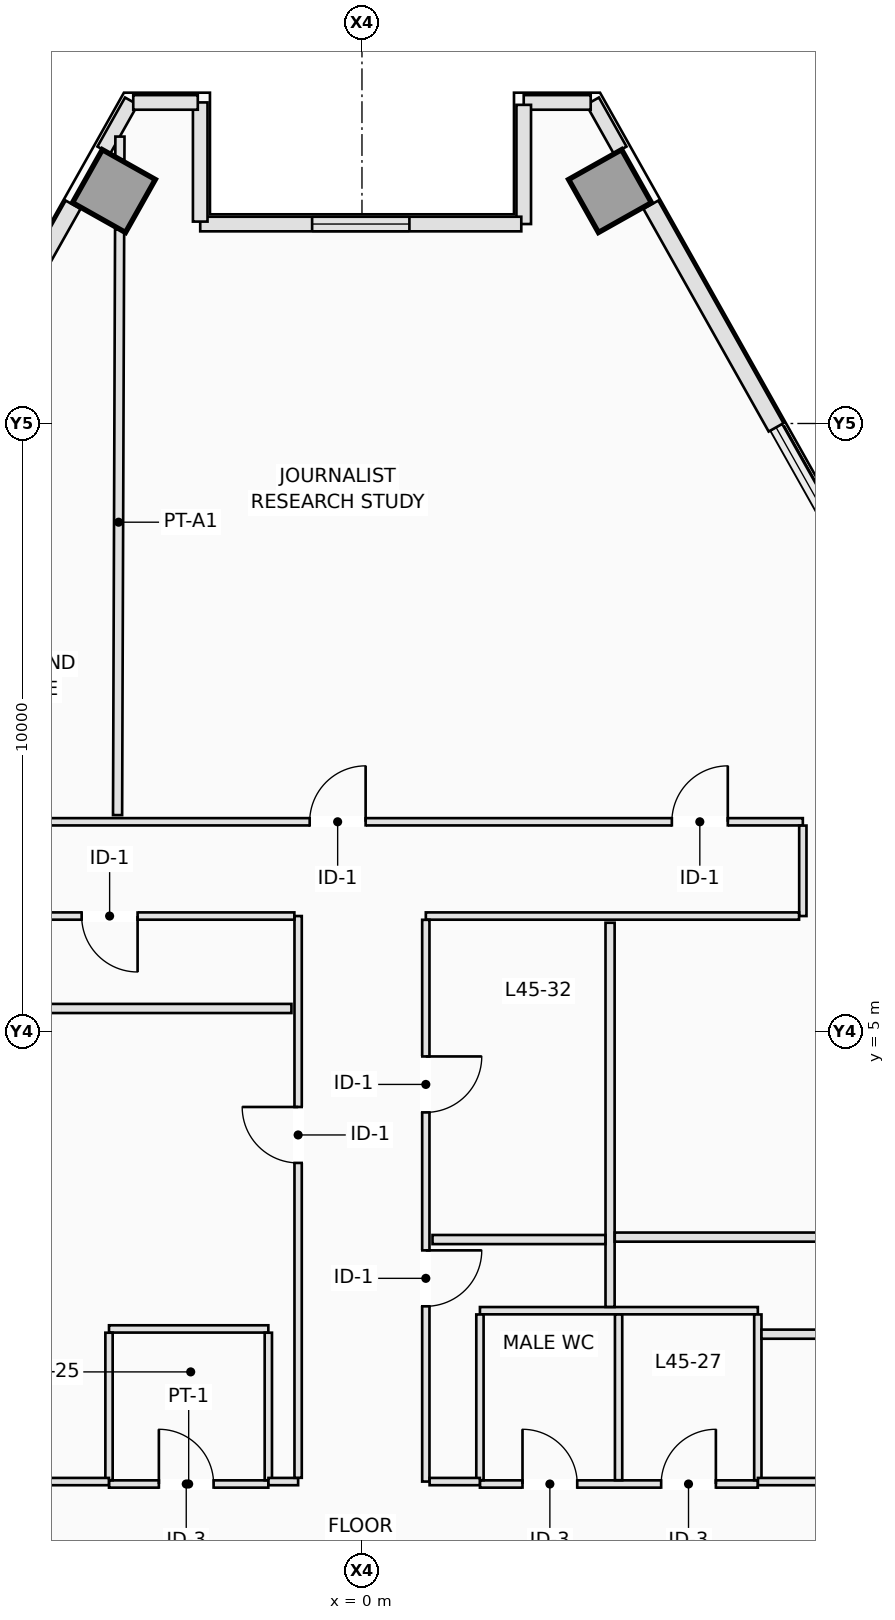
"""IFC4 building model, lengths in metres.
Left out: names, types, materials, properties, quantities, classifications, styles, units other than length and angle.
Written with IfcOpenShell. Run it as: python <this file> out.ifc"""

import sys

from ifc_helpers import new_model, si_unit, direction, frame, frame_2d, origin, origin_2d, place, context, subcontext, project, spatial, rectangle, extrude, element, fill, save


model = new_model("IFC4")
c1 = context("Model", 3, precision=1e-05, world=origin(), true_north=direction((0.0, 1.0)))
c2 = subcontext(c1, "Body", "Model", "MODEL_VIEW")
j1 = project(units=[si_unit("LENGTHUNIT", "METRE"), si_unit("PLANEANGLEUNIT", "RADIAN")], contexts=[c1])
p1 = place(None, origin())
s1 = spatial("IfcSite", under=j1, at=p1, CompositionType="ELEMENT")
p2 = place(p1, origin())
s2 = spatial("IfcBuilding", under=s1, at=p2, CompositionType="ELEMENT")
p3 = place(p2, frame((0.0, 0.0, 165.0)))
s3 = spatial("IfcBuildingStorey", under=s2, at=p3, CompositionType="ELEMENT", Elevation=165.0)
for number, where, z_axis, x_axis in (
    (1, (4.079, 18.822, 0.0), (0.0, 0.0, 1.0), (0.872, 0.49, 0.0)),
    (2, (-4.079, 18.822, 0.0), (0.0, 0.0, 1.0), (-0.872, 0.49, 0.0)),
):
    element("IfcColumn", number, at=place(p3, frame(where, z_axis=z_axis, x_axis=x_axis)), inside=s3, PredefinedType="COLUMN", context=c2, shape_type="SweptSolid", body=[
        extrude(rectangle(XDim=1.0, YDim=1.0, at=origin_2d()), origin(), (0.0, 0.0, 1.0), 3.5),
    ])
p4 = place(p3, frame((3.792, 20.302, 0.0), z_axis=(0.0, 0.0, 1.0), x_axis=(0.490048346303, -0.871695255399, 0.0)))
e3 = element("IfcWall", 3, at=p4, inside=s3, PredefinedType="STANDARD", context=c2, shape_type="SweptSolid", body=[
    extrude(rectangle(XDim=0.926, YDim=0.24, at=frame_2d((0.463, 0.0))), origin(), (0.0, 0.0, 1.0), 3.25),
])
p5 = place(p3, frame((4.751, 18.597, 0.0), z_axis=(0.0, 0.0, 1.0), x_axis=(0.490250201787, -0.871581745821, 0.0)))
e4 = element("IfcWall", 4, at=p5, inside=s3, PredefinedType="STANDARD", context=c2, shape_type="SweptSolid", body=[
    extrude(rectangle(XDim=4.201, YDim=0.28, at=frame_2d((2.1, 0.0))), origin(), (0.0, 0.0, 1.0), 3.25),
])
p6 = place(p3, frame((-4.246, 19.495, 0.0), z_axis=(0.0, 0.0, 1.0), x_axis=(0.490048346303, 0.871695255399, 0.0)))
e5 = element("IfcWall", 5, at=p6, inside=s3, PredefinedType="STANDARD", context=c2, shape_type="SweptSolid", body=[
    extrude(rectangle(XDim=0.926, YDim=0.24, at=frame_2d((0.463, 0.0))), origin(), (0.0, 0.0, 1.0), 3.25),
])
p7 = place(p3, frame((-6.81, 14.936, 0.0), z_axis=(0.0, 0.0, 1.0), x_axis=(0.490250201787, 0.871581745821, 0.0)))
e6 = element("IfcWall", 6, at=p7, inside=s3, PredefinedType="STANDARD", context=c2, shape_type="SweptSolid", body=[
    extrude(rectangle(XDim=4.201, YDim=0.28, at=frame_2d((2.1, 0.0))), origin(), (0.0, 0.0, 1.0), 3.25),
])
p8 = place(p3, frame((3.761, 20.28, 0.0), z_axis=(0.0, 0.0, 1.0), x_axis=(-1.0, 0.0, 0.0)))
e7 = element("IfcWall", 7, at=p8, inside=s3, PredefinedType="STANDARD", context=c2, shape_type="SweptSolid", body=[
    extrude(rectangle(XDim=1.102, YDim=0.24, at=frame_2d((0.551, 0.0))), origin(), (0.0, 0.0, 1.0), 3.25),
])
p9 = place(p3, frame((2.66, 20.24, 0.0), z_axis=(0.0, 0.0, 1.0), x_axis=(0.0, -1.0, 0.0)))
e8 = element("IfcWall", 8, at=p9, inside=s3, PredefinedType="STANDARD", context=c2, shape_type="SweptSolid", body=[
    extrude(rectangle(XDim=1.96, YDim=0.24, at=frame_2d((0.98, 0.0))), origin(), (0.0, 0.0, 1.0), 3.25),
])
p10 = place(p3, frame((2.62, 18.28, 0.0), z_axis=(0.0, 0.0, 1.0), x_axis=(-1.0, 0.0, 0.0)))
e9 = element("IfcWall", 9, at=p10, inside=s3, PredefinedType="STANDARD", context=c2, shape_type="SweptSolid", body=[
    extrude(rectangle(XDim=5.28, YDim=0.24, at=frame_2d((2.64, 0.0))), origin(), (0.0, 0.0, 1.0), 3.25),
])
p11 = place(p10, frame((1.84, 0.0, 0.9)))
e10 = element("IfcOpeningElement", 10, at=p11, cuts=e9, PredefinedType="OPENING", context=c2, shape_type="SweptSolid", body=[
    extrude(rectangle(XDim=1.6, YDim=2.1, at=frame_2d((0.8, 1.05))), frame((0.0, 0.13, 0.0), z_axis=(0.0, -1.0, 0.0), x_axis=(1.0, 0.0, 0.0)), (0.0, 0.0, 1.0), 0.26),
])
p12 = place(p3, frame((-2.66, 18.32, 0.0), z_axis=(0.0, 0.0, 1.0), x_axis=(0.0, 1.0, 0.0)))
e11 = element("IfcWall", 11, at=p12, inside=s3, PredefinedType="STANDARD", context=c2, shape_type="SweptSolid", body=[
    extrude(rectangle(XDim=1.96, YDim=0.24, at=frame_2d((0.98, 0.0))), origin(), (0.0, 0.0, 1.0), 3.25),
])
p13 = place(p3, frame((-2.7, 20.28, 0.0), z_axis=(0.0, 0.0, 1.0), x_axis=(-1.0, 0.0, 0.0)))
e12 = element("IfcWall", 12, at=p13, inside=s3, PredefinedType="STANDARD", context=c2, shape_type="SweptSolid", body=[
    extrude(rectangle(XDim=1.062, YDim=0.24, at=frame_2d((0.531, 0.0))), origin(), (0.0, 0.0, 1.0), 3.25),
])
p14 = place(p3, frame((-4.16, -2.44, 0.0), z_axis=(0.0, 0.0, 1.0), x_axis=(1.0, 0.0, 0.0)))
e13 = element("IfcWall", 13, at=p14, inside=s3, PredefinedType="PARTITIONING", context=c2, shape_type="SweptSolid", body=[
    extrude(rectangle(XDim=2.62, YDim=0.12, at=frame_2d((1.31, 0.0))), origin(), (0.0, 0.0, 1.0), 2.891),
])
p15 = place(p14, frame((0.82, 0.0, 0.0)))
e14 = element("IfcOpeningElement", 14, at=p15, cuts=e13, PredefinedType="OPENING", context=c2, shape_type="SweptSolid", body=[
    extrude(rectangle(XDim=0.9, YDim=2.12, at=frame_2d((0.45, 1.06))), frame((0.0, 0.07, 0.0), z_axis=(0.0, -1.0, 0.0), x_axis=(1.0, 0.0, 0.0)), (0.0, 0.0, 1.0), 0.14),
])
p16 = place(p3, frame((-4.16, 0.11, 0.0), z_axis=(0.0, 0.0, 1.0), x_axis=(1.0, 0.0, 0.0)))
e15 = element("IfcWall", 15, at=p16, inside=s3, PredefinedType="PARTITIONING", context=c2, shape_type="SweptSolid", body=[
    extrude(rectangle(XDim=2.62, YDim=0.12, at=frame_2d((1.31, 0.0))), origin(), (0.0, 0.0, 1.0), 3.25),
])
for number, where, z_axis, x_axis in (
    (16, (-4.16, -2.378, 0.0), (0.0, 0.0, 1.0), (0.0, 1.0, 0.0)),
    (17, (-1.54, -2.378, 0.0), (0.0, 0.0, 1.0), (0.0, 1.0, 0.0)),
):
    element("IfcWall", number, at=place(p3, frame(where, z_axis=z_axis, x_axis=x_axis)), inside=s3, PredefinedType="PARTITIONING", context=c2, shape_type="SweptSolid", body=[
        extrude(rectangle(XDim=2.426, YDim=0.12, at=frame_2d((1.213, 0.0))), origin(), (0.0, 0.0, 1.0), 3.25),
    ])
p17 = place(p3, frame((1.94, -2.44, 0.0), z_axis=(0.0, 0.0, 1.0), x_axis=(1.0, 0.0, 0.0)))
e18 = element("IfcWall", 18, at=p17, inside=s3, PredefinedType="PARTITIONING", context=c2, shape_type="SweptSolid", body=[
    extrude(rectangle(XDim=4.57, YDim=0.12, at=frame_2d((2.285, 0.0))), origin(), (0.0, 0.0, 1.0), 2.891),
])
p18 = place(p17, frame((0.7, 0.0, 0.0)))
e19 = element("IfcOpeningElement", 19, at=p18, cuts=e18, PredefinedType="OPENING", context=c2, shape_type="SweptSolid", body=[
    extrude(rectangle(XDim=0.9, YDim=2.12, at=frame_2d((0.45, 1.06))), frame((0.0, 0.07, 0.0), z_axis=(0.0, -1.0, 0.0), x_axis=(1.0, 0.0, 0.0)), (0.0, 0.0, 1.0), 0.14),
])
p19 = place(p17, frame((2.98, 0.0, 0.0)))
e20 = element("IfcOpeningElement", 20, at=p19, cuts=e18, PredefinedType="OPENING", context=c2, shape_type="SweptSolid", body=[
    extrude(rectangle(XDim=0.9, YDim=2.12, at=frame_2d((0.45, 1.06))), frame((0.0, 0.07, 0.0), z_axis=(0.0, -1.0, 0.0), x_axis=(1.0, 0.0, 0.0)), (0.0, 0.0, 1.0), 0.14),
])
p20 = place(p3, frame((1.94, 0.41, 0.0), z_axis=(0.0, 0.0, 1.0), x_axis=(1.0, 0.0, 0.0)))
e21 = element("IfcWall", 21, at=p20, inside=s3, PredefinedType="PARTITIONING", context=c2, shape_type="SweptSolid", body=[
    extrude(rectangle(XDim=4.57, YDim=0.12, at=frame_2d((2.285, 0.0))), origin(), (0.0, 0.0, 1.0), 3.25),
])
for number, where, z_axis, x_axis in (
    (22, (1.94, -2.378, 0.0), (0.0, 0.0, 1.0), (0.0, 1.0, 0.0)),
    (23, (4.22, -2.378, 0.0), (0.0, 0.0, 1.0), (0.0, 1.0, 0.0)),
    (24, (6.51, -2.378, 0.0), (0.0, 0.0, 1.0), (0.0, 1.0, 0.0)),
):
    element("IfcWall", number, at=place(p3, frame(where, z_axis=z_axis, x_axis=x_axis)), inside=s3, PredefinedType="PARTITIONING", context=c2, shape_type="SweptSolid", body=[
        extrude(rectangle(XDim=2.726, YDim=0.12, at=frame_2d((1.363, 0.0))), origin(), (0.0, 0.0, 1.0), 3.25),
    ])
p21 = place(p3, frame((-12.348, -2.4, 0.0), z_axis=(0.0, 0.0, 1.0), x_axis=(1.0, 0.0, 0.0)))
e25 = element("IfcWall", 25, at=p21, inside=s3, PredefinedType="PARTITIONING", context=c2, shape_type="SweptSolid", body=[
    extrude(rectangle(XDim=8.186, YDim=0.12, at=frame_2d((4.093, 0.0))), origin(), (0.0, 0.0, 1.0), 2.891),
])
p22 = place(p21, frame((3.722, 0.0, 0.0)))
e26 = element("IfcOpeningElement", 26, at=p22, cuts=e25, PredefinedType="OPENING", context=c2, shape_type="SweptSolid", body=[
    extrude(rectangle(XDim=0.92, YDim=2.12, at=frame_2d((0.46, 1.06))), frame((0.0, 0.07, 0.0), z_axis=(0.0, -1.0, 0.0), x_axis=(1.0, 0.0, 0.0)), (0.0, 0.0, 1.0), 0.14),
])
p23 = place(p3, frame((-1.538, -2.4, 0.0), z_axis=(0.0, 0.0, 1.0), x_axis=(1.0, 0.0, 0.0)))
e27 = element("IfcWall", 27, at=p23, inside=s3, PredefinedType="PARTITIONING", context=c2, shape_type="SweptSolid", body=[
    extrude(rectangle(XDim=0.488, YDim=0.12, at=frame_2d((0.244, 0.0))), origin(), (0.0, 0.0, 1.0), 2.891),
])
p24 = place(p3, frame((-1.05, -2.338, 0.0), z_axis=(0.0, 0.0, 1.0), x_axis=(0.0, 1.0, 0.0)))
e28 = element("IfcWall", 28, at=p24, inside=s3, PredefinedType="PARTITIONING", context=c2, shape_type="SweptSolid", body=[
    extrude(rectangle(XDim=9.238, YDim=0.12, at=frame_2d((4.619, 0.0))), origin(), (0.0, 0.0, 1.0), 3.25),
])
p25 = place(p24, frame((5.178, 0.0, 0.0)))
e29 = element("IfcOpeningElement", 29, at=p25, cuts=e28, PredefinedType="OPENING", context=c2, shape_type="SweptSolid", body=[
    extrude(rectangle(XDim=0.92, YDim=2.12, at=frame_2d((0.46, 1.06))), frame((0.0, 0.07, 0.0), z_axis=(0.0, -1.0, 0.0), x_axis=(1.0, 0.0, 0.0)), (0.0, 0.0, 1.0), 0.14),
])
p26 = place(p3, frame((-1.112, 6.9, 0.0), z_axis=(0.0, 0.0, 1.0), x_axis=(-1.0, 0.0, 0.0)))
e30 = element("IfcWall", 30, at=p26, inside=s3, PredefinedType="PARTITIONING", context=c2, shape_type="SweptSolid", body=[
    extrude(rectangle(XDim=6.138, YDim=0.12, at=frame_2d((3.069, 0.0))), origin(), (0.0, 0.0, 1.0), 2.891),
])
p27 = place(p26, frame((2.578, 0.0, 0.0)))
e31 = element("IfcOpeningElement", 31, at=p27, cuts=e30, PredefinedType="OPENING", context=c2, shape_type="SweptSolid", body=[
    extrude(rectangle(XDim=0.92, YDim=2.12, at=frame_2d((0.46, 1.06))), frame((0.0, 0.07, 0.0), z_axis=(0.0, -1.0, 0.0), x_axis=(1.0, 0.0, 0.0)), (0.0, 0.0, 1.0), 0.14),
])
p28 = place(p3, frame((-7.188, 8.45, 0.0), z_axis=(0.0, 0.0, 1.0), x_axis=(1.0, 0.0, 0.0)))
e32 = element("IfcWall", 32, at=p28, inside=s3, PredefinedType="PARTITIONING", context=c2, shape_type="SweptSolid", body=[
    extrude(rectangle(XDim=14.438, YDim=0.12, at=frame_2d((7.219, 0.0))), origin(), (0.0, 0.0, 1.0), 3.25),
])
p29 = place(p28, frame((6.328, 0.0, 0.0)))
e33 = element("IfcOpeningElement", 33, at=p29, cuts=e32, PredefinedType="OPENING", context=c2, shape_type="SweptSolid", body=[
    extrude(rectangle(XDim=0.92, YDim=2.12, at=frame_2d((0.46, 1.06))), frame((0.0, 0.07, 0.0), z_axis=(0.0, -1.0, 0.0), x_axis=(1.0, 0.0, 0.0)), (0.0, 0.0, 1.0), 0.14),
])
p30 = place(p28, frame((12.284, 0.0, 0.0)))
e34 = element("IfcOpeningElement", 34, at=p30, cuts=e32, PredefinedType="OPENING", context=c2, shape_type="SweptSolid", body=[
    extrude(rectangle(XDim=0.92, YDim=2.12, at=frame_2d((0.46, 1.06))), frame((0.0, 0.07, 0.0), z_axis=(0.0, -1.0, 0.0), x_axis=(1.0, 0.0, 0.0)), (0.0, 0.0, 1.0), 0.14),
])
p31 = place(p3, frame((7.25, 8.388, 0.0), z_axis=(0.0, 0.0, 1.0), x_axis=(0.0, -1.0, 0.0)))
e35 = element("IfcWall", 35, at=p31, inside=s3, PredefinedType="PARTITIONING", context=c2, shape_type="SweptSolid", body=[
    extrude(rectangle(XDim=1.488, YDim=0.12, at=frame_2d((0.744, 0.0))), origin(), (0.0, 0.0, 1.0), 3.25),
])
p32 = place(p3, frame((7.188, 6.9, 0.0), z_axis=(0.0, 0.0, 1.0), x_axis=(-1.0, 0.0, 0.0)))
e36 = element("IfcWall", 36, at=p32, inside=s3, PredefinedType="PARTITIONING", context=c2, shape_type="SweptSolid", body=[
    extrude(rectangle(XDim=6.138, YDim=0.12, at=frame_2d((3.069, 0.0))), origin(), (0.0, 0.0, 1.0), 2.891),
])
p33 = place(p3, frame((1.05, 6.838, 0.0), z_axis=(0.0, 0.0, 1.0), x_axis=(0.0, -1.0, 0.0)))
e37 = element("IfcWall", 37, at=p33, inside=s3, PredefinedType="PARTITIONING", context=c2, shape_type="SweptSolid", body=[
    extrude(rectangle(XDim=9.238, YDim=0.12, at=frame_2d((4.619, 0.0))), origin(), (0.0, 0.0, 1.0), 3.25),
])
p34 = place(p33, frame((2.247, 0.0, 0.0)))
e38 = element("IfcOpeningElement", 38, at=p34, cuts=e37, PredefinedType="OPENING", context=c2, shape_type="SweptSolid", body=[
    extrude(rectangle(XDim=0.92, YDim=2.12, at=frame_2d((0.46, 1.06))), frame((0.0, 0.07, 0.0), z_axis=(0.0, -1.0, 0.0), x_axis=(1.0, 0.0, 0.0)), (0.0, 0.0, 1.0), 0.14),
])
p35 = place(p33, frame((5.436, 0.0, 0.0)))
e39 = element("IfcOpeningElement", 39, at=p35, cuts=e37, PredefinedType="OPENING", context=c2, shape_type="SweptSolid", body=[
    extrude(rectangle(XDim=0.92, YDim=2.12, at=frame_2d((0.46, 1.06))), frame((0.0, 0.07, 0.0), z_axis=(0.0, -1.0, 0.0), x_axis=(1.0, 0.0, 0.0)), (0.0, 0.0, 1.0), 0.14),
])
p36 = place(p3, frame((1.112, -2.4, 0.0), z_axis=(0.0, 0.0, 1.0), x_axis=(1.0, 0.0, 0.0)))
e40 = element("IfcWall", 40, at=p36, inside=s3, PredefinedType="PARTITIONING", context=c2, shape_type="SweptSolid", body=[
    extrude(rectangle(XDim=0.826, YDim=0.12, at=frame_2d((0.413, 0.0))), origin(), (0.0, 0.0, 1.0), 2.891),
])
p37 = place(p3, frame((6.512, -2.4, 0.0), z_axis=(0.0, 0.0, 1.0), x_axis=(1.0, 0.0, 0.0)))
e41 = element("IfcWall", 41, at=p37, inside=s3, PredefinedType="PARTITIONING", context=c2, shape_type="SweptSolid", body=[
    extrude(rectangle(XDim=5.898, YDim=0.12, at=frame_2d((2.949, 0.0))), origin(), (0.0, 0.0, 1.0), 3.25),
])
p38 = place(p37, frame((3.441, 0.0, 0.0)))
e42 = element("IfcOpeningElement", 42, at=p38, cuts=e41, PredefinedType="OPENING", context=c2, shape_type="SweptSolid", body=[
    extrude(rectangle(XDim=0.92, YDim=2.12, at=frame_2d((0.46, 1.06))), frame((0.0, 0.07, 0.0), z_axis=(0.0, -1.0, 0.0), x_axis=(1.0, 0.0, 0.0)), (0.0, 0.0, 1.0), 0.14),
])
p39 = place(p3, frame((-4.019, 8.56, 0.0), z_axis=(0.0, 0.0, 1.0), x_axis=(0.003497279608, 0.999993884499, 0.0)))
e43 = element("IfcWall", 43, at=p39, inside=s3, PredefinedType="PARTITIONING", context=c2, shape_type="SweptSolid", body=[
    extrude(rectangle(XDim=9.634, YDim=0.15, at=frame_2d((4.817, 0.0))), origin(), (0.0, 0.0, 1.0), 2.717),
])
p40 = place(p3, frame((-3.982, 19.343, 0.0), z_axis=(0.0, 0.0, 1.0), x_axis=(0.003906220198, 0.999992370693, 0.0)))
e44 = element("IfcWall", 44, at=p40, inside=s3, PredefinedType="PARTITIONING", context=c2, shape_type="SweptSolid", body=[
    extrude(rectangle(XDim=0.375, YDim=0.15, at=frame_2d((0.188, 0.0))), origin(), (0.0, 0.0, 1.0), 3.25),
])
p41 = place(p3, frame((-1.16, 5.38, 0.0), z_axis=(0.0, 0.0, 1.0), x_axis=(-1.0, 0.0, 0.0)))
e45 = element("IfcWall", 45, at=p41, inside=s3, PredefinedType="PARTITIONING", context=c2, shape_type="SweptSolid", body=[
    extrude(rectangle(XDim=10.863, YDim=0.15, at=frame_2d((5.431, 0.0))), origin(), (0.0, 0.0, 1.0), 3.25),
])
p42 = place(p3, frame((4.08, 0.472, 0.0), z_axis=(0.0, 0.0, 1.0), x_axis=(0.0, 1.0, 0.0)))
e46 = element("IfcWall", 46, at=p42, inside=s3, PredefinedType="PARTITIONING", context=c2, shape_type="SweptSolid", body=[
    extrude(rectangle(XDim=6.318, YDim=0.15, at=frame_2d((3.159, 0.0))), origin(), (0.0, 0.0, 1.0), 2.717),
])
p43 = place(p3, frame((14.306, 1.62, 0.0), z_axis=(0.0, 0.0, 1.0), x_axis=(-1.0, 0.0, 0.0)))
e47 = element("IfcWall", 47, at=p43, inside=s3, PredefinedType="PARTITIONING", context=c2, shape_type="SweptSolid", body=[
    extrude(rectangle(XDim=10.149, YDim=0.15, at=frame_2d((5.075, 0.0))), origin(), (0.0, 0.0, 1.0), 3.25),
])
p44 = place(p3, frame((4.003, 1.58, 0.0), z_axis=(0.0, 0.0, 1.0), x_axis=(-1.0, 0.0, 0.0)))
e48 = element("IfcWall", 48, at=p44, inside=s3, PredefinedType="PARTITIONING", context=c2, shape_type="SweptSolid", body=[
    extrude(rectangle(XDim=2.843, YDim=0.15, at=frame_2d((1.421, 0.0))), origin(), (0.0, 0.0, 1.0), 3.25),
])
p45 = place(p3, frame((15.204, 0.024, 0.0), z_axis=(0.0, 0.0, 1.0), x_axis=(-1.0, 0.0, 0.0)))
e49 = element("IfcWall", 49, at=p45, inside=s3, PredefinedType="PARTITIONING", context=c2, shape_type="SweptSolid", body=[
    extrude(rectangle(XDim=8.634, YDim=0.15, at=frame_2d((4.317, 0.0))), origin(), (0.0, 0.0, 1.0), 3.25),
])
p46 = place(p11, origin())
e50 = element("IfcWindow", 50, at=p46, inside=s3, PartitioningType="SINGLE_PANEL", PredefinedType="WINDOW", context=c2, shape_type="SweptSolid", body=[
    extrude(rectangle(XDim=1.6, YDim=2.1, at=frame_2d((0.8, 1.05))), frame((0.0, 0.03, 0.0), z_axis=(0.0, -1.0, 0.0), x_axis=(1.0, 0.0, 0.0)), (0.0, 0.0, 1.0), 0.06),
])
fill(e10, e50)
p47 = place(p15, origin())
e51 = element("IfcDoor", 51, at=p47, inside=s3, OperationType="SINGLE_SWING_LEFT", PredefinedType="DOOR", context=c2, shape_type="SweptSolid", body=[
    extrude(rectangle(XDim=0.9, YDim=2.12, at=frame_2d((0.45, 1.06))), frame((0.0, 0.025, 0.0), z_axis=(0.0, -1.0, 0.0), x_axis=(1.0, 0.0, 0.0)), (0.0, 0.0, 1.0), 0.05),
])
fill(e14, e51)
p48 = place(p18, origin())
e52 = element("IfcDoor", 52, at=p48, inside=s3, OperationType="SINGLE_SWING_LEFT", PredefinedType="DOOR", context=c2, shape_type="SweptSolid", body=[
    extrude(rectangle(XDim=0.9, YDim=2.12, at=frame_2d((0.45, 1.06))), frame((0.0, 0.025, 0.0), z_axis=(0.0, -1.0, 0.0), x_axis=(1.0, 0.0, 0.0)), (0.0, 0.0, 1.0), 0.05),
])
fill(e19, e52)
p49 = place(p19, origin())
e53 = element("IfcDoor", 53, at=p49, inside=s3, OperationType="SINGLE_SWING_RIGHT", PredefinedType="DOOR", context=c2, shape_type="SweptSolid", body=[
    extrude(rectangle(XDim=0.9, YDim=2.12, at=frame_2d((0.45, 1.06))), frame((0.0, 0.025, 0.0), z_axis=(0.0, -1.0, 0.0), x_axis=(1.0, 0.0, 0.0)), (0.0, 0.0, 1.0), 0.05),
])
fill(e20, e53)
p50 = place(p29, origin())
e54 = element("IfcDoor", 54, at=p50, inside=s3, OperationType="SINGLE_SWING_RIGHT", PredefinedType="DOOR", context=c2, shape_type="SweptSolid", body=[
    extrude(rectangle(XDim=0.92, YDim=2.12, at=frame_2d((0.46, 1.06))), frame((0.0, 0.025, 0.0), z_axis=(0.0, -1.0, 0.0), x_axis=(1.0, 0.0, 0.0)), (0.0, 0.0, 1.0), 0.05),
])
fill(e33, e54)
p51 = place(p27, origin())
e55 = element("IfcDoor", 55, at=p51, inside=s3, OperationType="SINGLE_SWING_LEFT", PredefinedType="DOOR", context=c2, shape_type="SweptSolid", body=[
    extrude(rectangle(XDim=0.92, YDim=2.12, at=frame_2d((0.46, 1.06))), frame((0.0, 0.025, 0.0), z_axis=(0.0, -1.0, 0.0), x_axis=(1.0, 0.0, 0.0)), (0.0, 0.0, 1.0), 0.05),
])
fill(e31, e55)
p52 = place(p30, origin())
e56 = element("IfcDoor", 56, at=p52, inside=s3, OperationType="SINGLE_SWING_RIGHT", PredefinedType="DOOR", context=c2, shape_type="SweptSolid", body=[
    extrude(rectangle(XDim=0.92, YDim=2.12, at=frame_2d((0.46, 1.06))), frame((0.0, 0.025, 0.0), z_axis=(0.0, -1.0, 0.0), x_axis=(1.0, 0.0, 0.0)), (0.0, 0.0, 1.0), 0.05),
])
fill(e34, e56)
p53 = place(p34, origin())
e57 = element("IfcDoor", 57, at=p53, inside=s3, OperationType="SINGLE_SWING_LEFT", PredefinedType="DOOR", context=c2, shape_type="SweptSolid", body=[
    extrude(rectangle(XDim=0.92, YDim=2.12, at=frame_2d((0.46, 1.06))), frame((0.0, 0.025, 0.0), z_axis=(0.0, -1.0, 0.0), x_axis=(1.0, 0.0, 0.0)), (0.0, 0.0, 1.0), 0.05),
])
fill(e38, e57)
p54 = place(p25, origin())
e58 = element("IfcDoor", 58, at=p54, inside=s3, OperationType="SINGLE_SWING_RIGHT", PredefinedType="DOOR", context=c2, shape_type="SweptSolid", body=[
    extrude(rectangle(XDim=0.92, YDim=2.12, at=frame_2d((0.46, 1.06))), frame((0.0, 0.025, 0.0), z_axis=(0.0, -1.0, 0.0), x_axis=(1.0, 0.0, 0.0)), (0.0, 0.0, 1.0), 0.05),
])
fill(e29, e58)
p55 = place(p35, origin())
e59 = element("IfcDoor", 59, at=p55, inside=s3, OperationType="SINGLE_SWING_LEFT", PredefinedType="DOOR", context=c2, shape_type="SweptSolid", body=[
    extrude(rectangle(XDim=0.92, YDim=2.12, at=frame_2d((0.46, 1.06))), frame((0.0, 0.025, 0.0), z_axis=(0.0, -1.0, 0.0), x_axis=(1.0, 0.0, 0.0)), (0.0, 0.0, 1.0), 0.05),
])
fill(e39, e59)
save(model, sys.argv[1])
